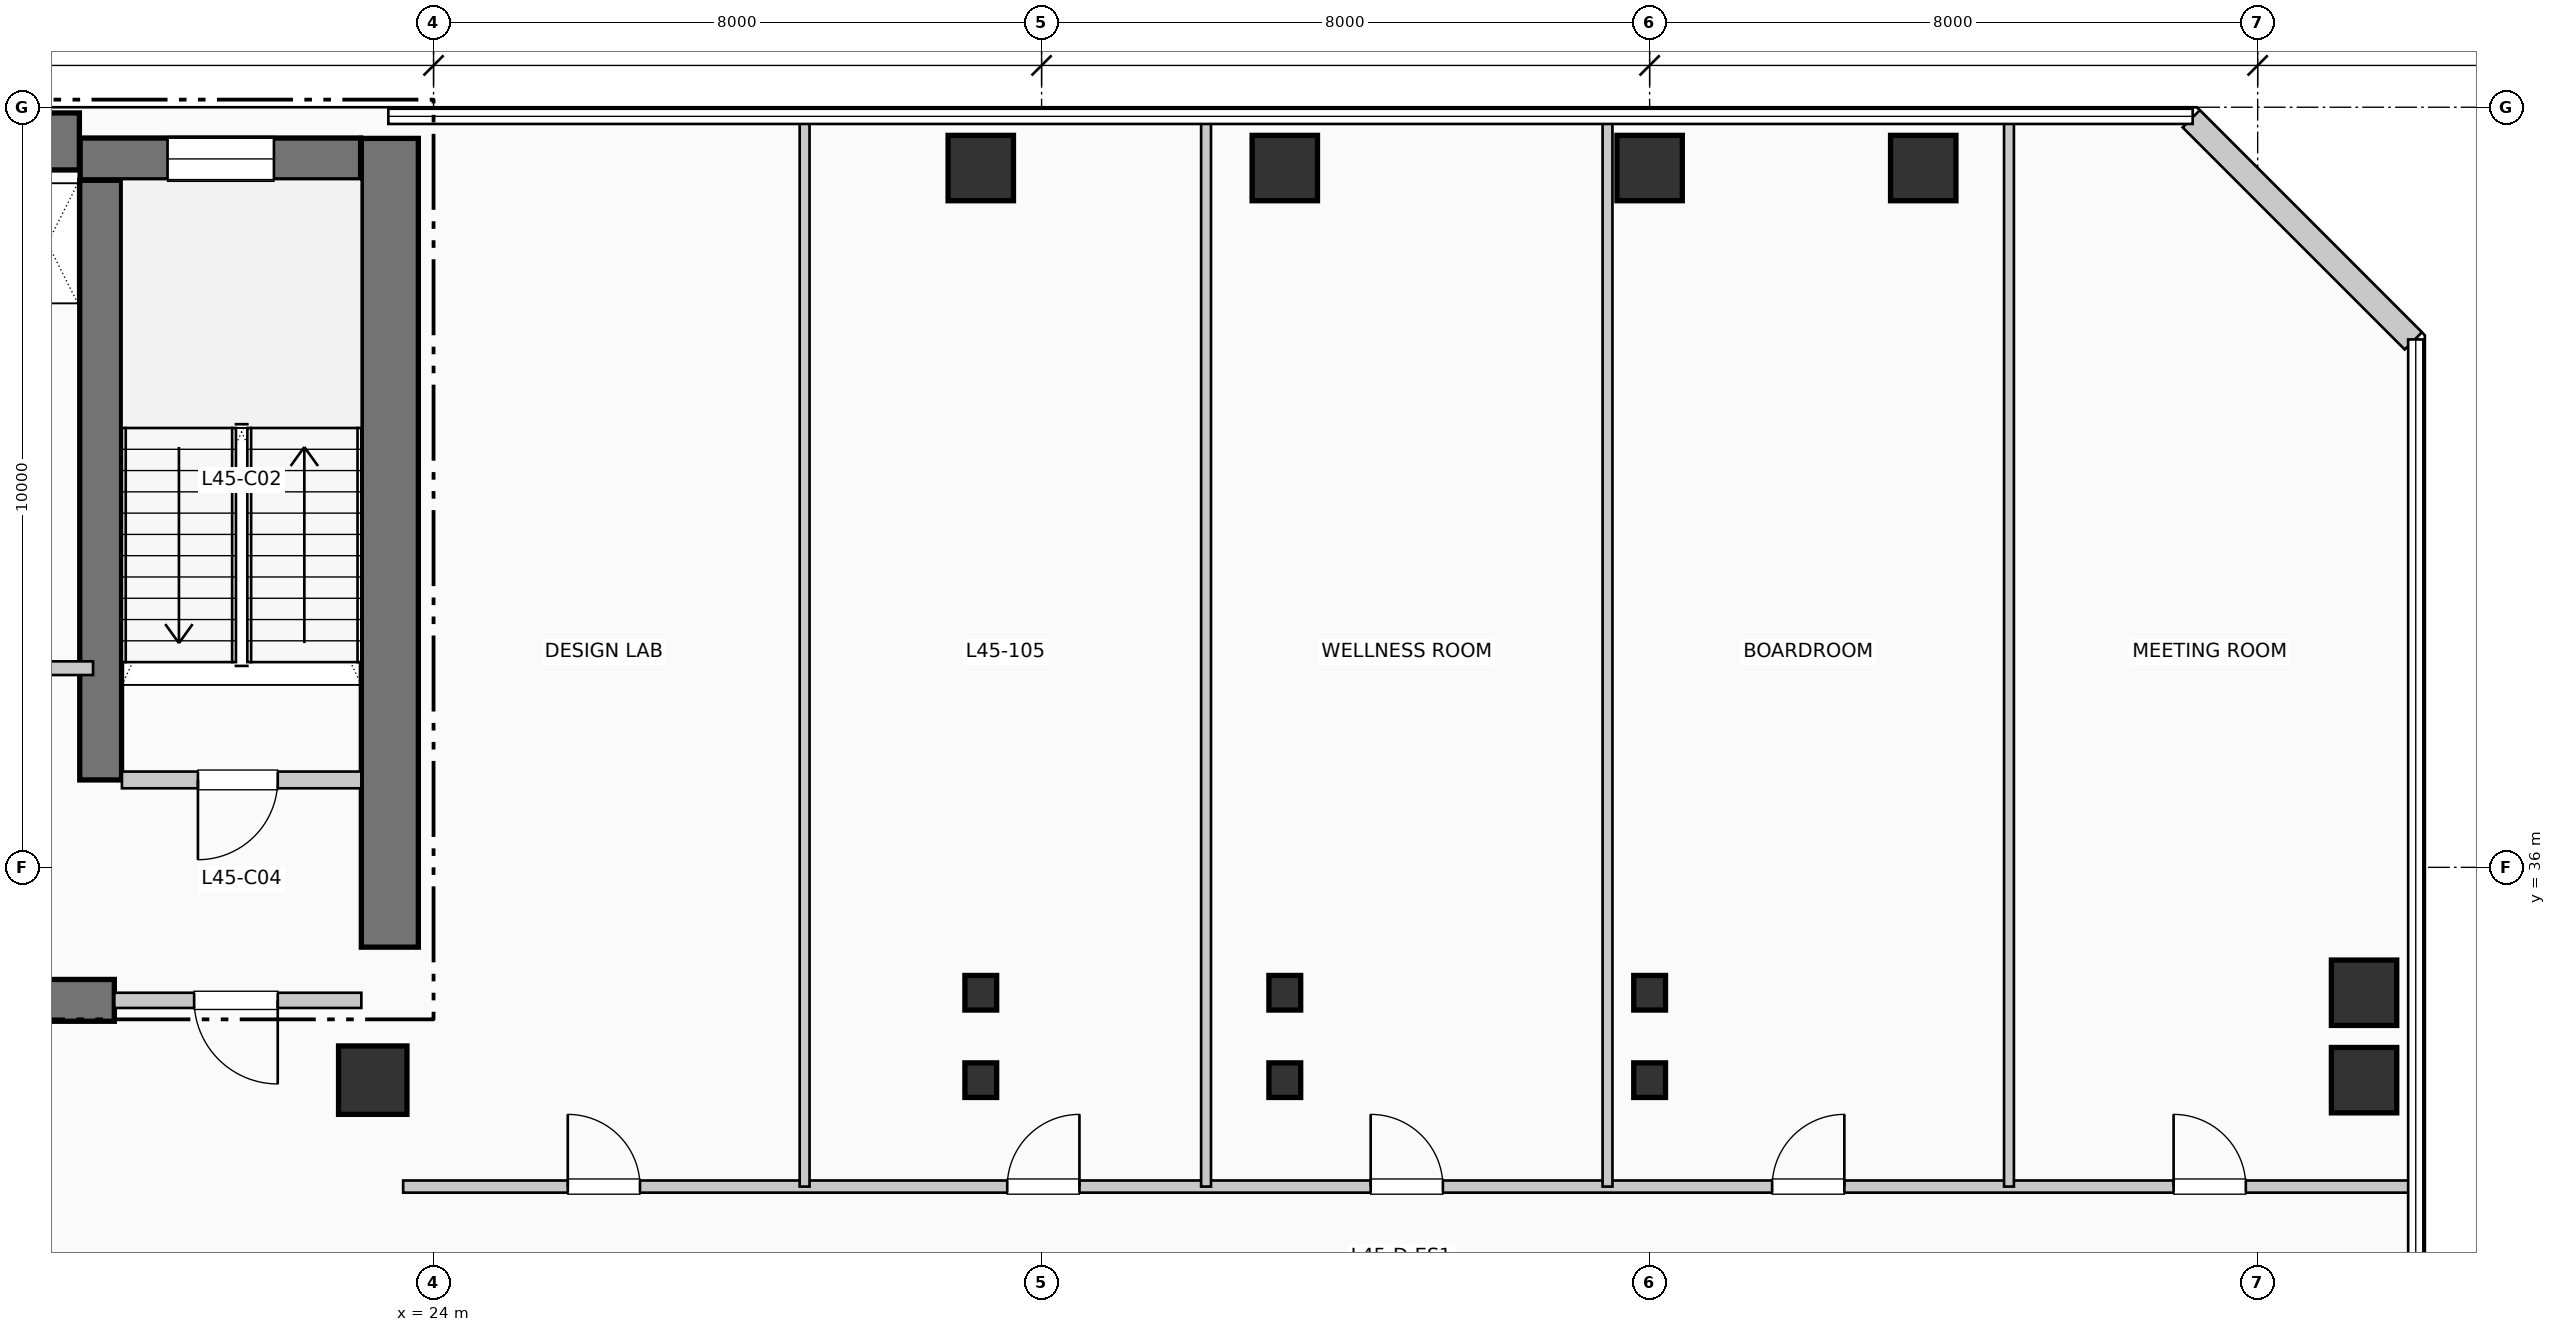
"""IFC4 building model, lengths in metres.
Left out: names, types, materials, properties, quantities, classifications, styles, units other than length and angle.
Written with IfcOpenShell. Run it as: python <this file> out.ifc"""

import sys

from ifc_helpers import new_model, si_unit, direction, frame, frame_2d, origin, origin_2d, place, context, subcontext, project, spatial, rectangle, i_section, extrude, element, fill, save


model = new_model("IFC4")
c1 = context("Model", 3, precision=1e-05, world=origin(), true_north=direction((0.0, 1.0)))
c2 = subcontext(c1, "Body", "Model", "MODEL_VIEW")
j1 = project(units=[si_unit("LENGTHUNIT", "METRE"), si_unit("PLANEANGLEUNIT", "RADIAN")], contexts=[c1])
p1 = place(None, origin())
s1 = spatial("IfcSite", under=j1, at=p1, CompositionType="ELEMENT")
p2 = place(p1, origin())
s2 = spatial("IfcBuilding", under=s1, at=p2, CompositionType="ELEMENT")
p3 = place(p2, frame((0.0, 0.0, 187.44)))
s3 = spatial("IfcBuildingStorey", under=s2, at=p3, CompositionType="ELEMENT", Elevation=187.44)
p4 = place(p3, frame((5.36, 45.55, 0.0), z_axis=(0.0, 0.0, 1.0), x_axis=(1.0, 0.0, 0.0)))
e1 = element("IfcWall", 1, at=p4, inside=s3, PredefinedType="SHEAR", context=c2, shape_type="SweptSolid", body=[
    extrude(rectangle(XDim=13.98, YDim=0.75, at=frame_2d((6.99, 0.0))), origin(), (0.0, 0.0, 1.0), 3.96),
])
p5 = place(p3, frame((23.425, 34.95, 0.0), z_axis=(0.0, 0.0, 1.0), x_axis=(0.0, 1.0, 0.0)))
e2 = element("IfcWall", 2, at=p5, inside=s3, PredefinedType="SHEAR", context=c2, shape_type="SweptSolid", body=[
    extrude(rectangle(XDim=10.64, YDim=0.75, at=frame_2d((5.32, 0.0))), origin(), (0.0, 0.0, 1.0), 3.96),
])
p6 = place(p3, frame((13.68, 34.25, 0.0), z_axis=(0.0, 0.0, 1.0), x_axis=(1.0, 0.0, 0.0)))
e3 = element("IfcWall", 3, at=p6, inside=s3, PredefinedType="SHEAR", context=c2, shape_type="SweptSolid", body=[
    extrude(rectangle(XDim=6.12, YDim=0.55, at=frame_2d((3.06, 0.0))), origin(), (0.0, 0.0, 1.0), 3.96),
])
p7 = place(p3, frame((19.62, 37.15, 0.0), z_axis=(0.0, 0.0, 1.0), x_axis=(0.0, 1.0, 0.0)))
e4 = element("IfcWall", 4, at=p7, inside=s3, PredefinedType="SHEAR", context=c2, shape_type="SweptSolid", body=[
    extrude(rectangle(XDim=7.89, YDim=0.55, at=frame_2d((3.945, 0.0))), origin(), (0.0, 0.0, 1.0), 3.96),
])
p8 = place(p3, frame((19.35, 45.32, 0.0), z_axis=(0.0, 0.0, 1.0), x_axis=(1.0, 0.0, 0.0)))
e5 = element("IfcWall", 5, at=p8, inside=s3, PredefinedType="SHEAR", context=c2, shape_type="SweptSolid", body=[
    extrude(rectangle(XDim=3.69, YDim=0.55, at=frame_2d((1.845, 0.0))), origin(), (0.0, 0.0, 1.0), 3.96),
])
p9 = place(p8, frame((1.15, 0.0, 1.05)))
e6 = element("IfcOpeningElement", 6, at=p9, cuts=e5, PredefinedType="OPENING", context=c2, shape_type="SweptSolid", body=[
    extrude(rectangle(XDim=1.4, YDim=1.8, at=frame_2d((0.7, 0.9))), frame((0.0, 0.285, 0.0), z_axis=(0.0, -1.0, 0.0), x_axis=(1.0, 0.0, 0.0)), (0.0, 0.0, 1.0), 0.57),
])
p10 = place(p3, frame((23.2, 33.2, 0.0), z_axis=(0.0, 0.0, 1.0), x_axis=(1.0, 0.0, 0.0)))
e7 = element("IfcColumn", 7, at=p10, inside=s3, PredefinedType="COLUMN", context=c2, shape_type="SweptSolid", body=[
    extrude(rectangle(XDim=0.9, YDim=0.9, at=origin_2d()), origin(), (0.0, 0.0, 1.0), 3.96),
])
for number, where, z_axis, x_axis in (
    (8, (31.2, 33.2, 0.0), (0.0, 0.0, 1.0), (1.0, 0.0, 0.0)),
    (9, (31.2, 34.35, 0.0), (0.0, 0.0, 1.0), (1.0, 0.0, 0.0)),
):
    element("IfcColumn", number, at=place(p3, frame(where, z_axis=z_axis, x_axis=x_axis)), inside=s3, PredefinedType="COLUMN", context=c2, shape_type="SweptSolid", body=[
        extrude(i_section(OverallWidth=0.418, OverallDepth=0.455, WebThickness=0.032, FlangeThickness=0.051, at=origin_2d()), origin(), (0.0, 0.0, 1.0), 3.96),
    ])
p11 = place(p3, frame((31.2, 45.2, 0.0), z_axis=(0.0, 0.0, 1.0), x_axis=(1.0, 0.0, 0.0)))
e10 = element("IfcColumn", 10, at=p11, inside=s3, PredefinedType="COLUMN", context=c2, shape_type="SweptSolid", body=[
    extrude(rectangle(XDim=0.86, YDim=0.86, at=origin_2d()), origin(), (0.0, 0.0, 1.0), 3.96),
])
for number, where, z_axis, x_axis in (
    (11, (35.2, 33.2, 0.0), (0.0, 0.0, 1.0), (1.0, 0.0, 0.0)),
    (12, (35.2, 34.35, 0.0), (0.0, 0.0, 1.0), (1.0, 0.0, 0.0)),
):
    element("IfcColumn", number, at=place(p3, frame(where, z_axis=z_axis, x_axis=x_axis)), inside=s3, PredefinedType="COLUMN", context=c2, shape_type="SweptSolid", body=[
        extrude(i_section(OverallWidth=0.418, OverallDepth=0.455, WebThickness=0.032, FlangeThickness=0.051, at=origin_2d()), origin(), (0.0, 0.0, 1.0), 3.96),
    ])
p12 = place(p3, frame((35.2, 45.2, 0.0), z_axis=(0.0, 0.0, 1.0), x_axis=(1.0, 0.0, 0.0)))
e13 = element("IfcColumn", 13, at=p12, inside=s3, PredefinedType="COLUMN", context=c2, shape_type="SweptSolid", body=[
    extrude(rectangle(XDim=0.86, YDim=0.86, at=origin_2d()), origin(), (0.0, 0.0, 1.0), 3.96),
])
for number, where, z_axis, x_axis in (
    (14, (40.0, 33.2, 0.0), (0.0, 0.0, 1.0), (1.0, 0.0, 0.0)),
    (15, (40.0, 34.35, 0.0), (0.0, 0.0, 1.0), (1.0, 0.0, 0.0)),
):
    element("IfcColumn", number, at=place(p3, frame(where, z_axis=z_axis, x_axis=x_axis)), inside=s3, PredefinedType="COLUMN", context=c2, shape_type="SweptSolid", body=[
        extrude(i_section(OverallWidth=0.418, OverallDepth=0.455, WebThickness=0.032, FlangeThickness=0.051, at=origin_2d()), origin(), (0.0, 0.0, 1.0), 3.96),
    ])
for number, where, z_axis, x_axis in (
    (16, (40.0, 45.2, 0.0), (0.0, 0.0, 1.0), (1.0, 0.0, 0.0)),
    (17, (43.6, 45.2, 0.0), (0.0, 0.0, 1.0), (1.0, 0.0, 0.0)),
    (18, (49.4, 33.2, 0.0), (0.0, 0.0, 1.0), (1.0, 0.0, 0.0)),
    (19, (49.4, 34.35, 0.0), (0.0, 0.0, 1.0), (1.0, 0.0, 0.0)),
):
    element("IfcColumn", number, at=place(p3, frame(where, z_axis=z_axis, x_axis=x_axis)), inside=s3, PredefinedType="COLUMN", context=c2, shape_type="SweptSolid", body=[
        extrude(rectangle(XDim=0.86, YDim=0.86, at=origin_2d()), origin(), (0.0, 0.0, 1.0), 3.96),
    ])
p13 = place(p3, frame((50.048, 42.926, 0.0), z_axis=(0.0, 0.0, 1.0), x_axis=(-0.707136318428, 0.707077242712, 0.0)))
e20 = element("IfcWall", 20, at=p13, inside=s3, PredefinedType="SOLIDWALL", context=c2, shape_type="SweptSolid", body=[
    extrude(rectangle(XDim=4.133, YDim=0.32, at=frame_2d((2.066, 0.0))), origin(), (0.0, 0.0, 1.0), 3.71),
])
p14 = place(p3, frame((19.9, 37.15, 0.0), z_axis=(0.0, 0.0, 1.0), x_axis=(1.0, 0.0, 0.0)))
e21 = element("IfcWall", 21, at=p14, inside=s3, PredefinedType="PARTITIONING", context=c2, shape_type="SweptSolid", body=[
    extrude(rectangle(XDim=3.15, YDim=0.22, at=frame_2d((1.575, 0.0))), origin(), (0.0, 0.0, 1.0), 3.71),
])
p15 = place(p14, frame((2.05, 0.0, 0.0), z_axis=(0.0, 0.0, 1.0), x_axis=(-1.0, 0.0, 0.0)))
e22 = element("IfcOpeningElement", 22, at=p15, cuts=e21, PredefinedType="OPENING", context=c2, shape_type="SweptSolid", body=[
    extrude(rectangle(XDim=1.05, YDim=2.15, at=frame_2d((0.525, 1.075))), frame((0.0, 0.12, 0.0), z_axis=(0.0, -1.0, 0.0), x_axis=(1.0, 0.0, 0.0)), (0.0, 0.0, 1.0), 0.24),
])
p16 = place(p3, frame((19.8, 34.25, 0.0), z_axis=(0.0, 0.0, 1.0), x_axis=(1.0, 0.0, 0.0)))
e23 = element("IfcWall", 23, at=p16, inside=s3, PredefinedType="PARTITIONING", context=c2, shape_type="SweptSolid", body=[
    extrude(rectangle(XDim=3.25, YDim=0.2, at=frame_2d((1.625, 0.0))), origin(), (0.0, 0.0, 1.0), 3.71),
])
p17 = place(p16, frame((2.15, 0.0, 0.0), z_axis=(0.0, 0.0, 1.0), x_axis=(-1.0, 0.0, 0.0)))
e24 = element("IfcOpeningElement", 24, at=p17, cuts=e23, PredefinedType="OPENING", context=c2, shape_type="SweptSolid", body=[
    extrude(rectangle(XDim=1.1, YDim=2.15, at=frame_2d((0.55, 1.075))), frame((0.0, 0.11, 0.0), z_axis=(0.0, -1.0, 0.0), x_axis=(1.0, 0.0, 0.0)), (0.0, 0.0, 1.0), 0.22),
])
p18 = place(p3, frame((17.68, 38.62, 0.0), z_axis=(0.0, 0.0, 1.0), x_axis=(1.0, 0.0, 0.0)))
e25 = element("IfcWall", 25, at=p18, inside=s3, PredefinedType="PARTITIONING", context=c2, shape_type="SweptSolid", body=[
    extrude(rectangle(XDim=1.84, YDim=0.18, at=frame_2d((0.92, 0.0))), origin(), (0.0, 0.0, 1.0), 3.71),
])
p19 = place(p18, frame((0.24, 0.0, 0.0)))
e26 = element("IfcOpeningElement", 26, at=p19, cuts=e25, PredefinedType="OPENING", context=c2, shape_type="SweptSolid", body=[
    extrude(rectangle(XDim=0.92, YDim=2.1, at=frame_2d((0.46, 1.05))), frame((0.0, 0.1, 0.0), z_axis=(0.0, -1.0, 0.0), x_axis=(1.0, 0.0, 0.0)), (0.0, 0.0, 1.0), 0.2),
])
p20 = place(p3, frame((23.6, 31.8, 0.0), z_axis=(0.0, 0.0, 1.0), x_axis=(1.0, 0.0, 0.0)))
e27 = element("IfcWall", 27, at=p20, inside=s3, PredefinedType="PARTITIONING", context=c2, shape_type="SweptSolid", body=[
    extrude(rectangle(XDim=26.41, YDim=0.16, at=frame_2d((13.205, 0.0))), origin(), (0.0, 0.0, 1.0), 3.71),
])
p21 = place(p20, frame((2.166, 0.0, 0.0)))
e28 = element("IfcOpeningElement", 28, at=p21, cuts=e27, PredefinedType="OPENING", context=c2, shape_type="SweptSolid", body=[
    extrude(rectangle(XDim=0.95, YDim=2.15, at=frame_2d((0.475, 1.075))), frame((0.0, 0.09, 0.0), z_axis=(0.0, -1.0, 0.0), x_axis=(1.0, 0.0, 0.0)), (0.0, 0.0, 1.0), 0.18),
])
p22 = place(p20, frame((7.948, 0.0, 0.0)))
e29 = element("IfcOpeningElement", 29, at=p22, cuts=e27, PredefinedType="OPENING", context=c2, shape_type="SweptSolid", body=[
    extrude(rectangle(XDim=0.95, YDim=2.15, at=frame_2d((0.475, 1.075))), frame((0.0, 0.09, 0.0), z_axis=(0.0, -1.0, 0.0), x_axis=(1.0, 0.0, 0.0)), (0.0, 0.0, 1.0), 0.18),
])
p23 = place(p20, frame((12.73, 0.0, 0.0)))
e30 = element("IfcOpeningElement", 30, at=p23, cuts=e27, PredefinedType="OPENING", context=c2, shape_type="SweptSolid", body=[
    extrude(rectangle(XDim=0.95, YDim=2.15, at=frame_2d((0.475, 1.075))), frame((0.0, 0.09, 0.0), z_axis=(0.0, -1.0, 0.0), x_axis=(1.0, 0.0, 0.0)), (0.0, 0.0, 1.0), 0.18),
])
p24 = place(p20, frame((18.012, 0.0, 0.0)))
e31 = element("IfcOpeningElement", 31, at=p24, cuts=e27, PredefinedType="OPENING", context=c2, shape_type="SweptSolid", body=[
    extrude(rectangle(XDim=0.95, YDim=2.15, at=frame_2d((0.475, 1.075))), frame((0.0, 0.09, 0.0), z_axis=(0.0, -1.0, 0.0), x_axis=(1.0, 0.0, 0.0)), (0.0, 0.0, 1.0), 0.18),
])
p25 = place(p20, frame((23.294, 0.0, 0.0)))
e32 = element("IfcOpeningElement", 32, at=p25, cuts=e27, PredefinedType="OPENING", context=c2, shape_type="SweptSolid", body=[
    extrude(rectangle(XDim=0.95, YDim=2.15, at=frame_2d((0.475, 1.075))), frame((0.0, 0.09, 0.0), z_axis=(0.0, -1.0, 0.0), x_axis=(1.0, 0.0, 0.0)), (0.0, 0.0, 1.0), 0.18),
])
for number, where, z_axis, x_axis in (
    (33, (28.882, 31.8, 0.0), (0.0, 0.0, 1.0), (0.0, 1.0, 0.0)),
    (34, (34.164, 31.8, 0.0), (0.0, 0.0, 1.0), (0.0, 1.0, 0.0)),
    (35, (39.446, 31.8, 0.0), (0.0, 0.0, 1.0), (0.0, 1.0, 0.0)),
    (36, (44.728, 31.8, 0.0), (0.0, 0.0, 1.0), (0.0, 1.0, 0.0)),
):
    element("IfcWall", number, at=place(p3, frame(where, z_axis=z_axis, x_axis=x_axis)), inside=s3, PredefinedType="PARTITIONING", context=c2, shape_type="SweptSolid", body=[
        extrude(rectangle(XDim=14.01, YDim=0.13, at=frame_2d((7.005, 0.0))), origin(), (0.0, 0.0, 1.0), 3.71),
    ])
p26 = place(p9, origin())
e37 = element("IfcWindow", 37, at=p26, inside=s3, PartitioningType="SINGLE_PANEL", PredefinedType="WINDOW", context=c2, shape_type="SweptSolid", body=[
    extrude(rectangle(XDim=1.4, YDim=1.8, at=frame_2d((0.7, 0.9))), frame((0.0, 0.03, 0.0), z_axis=(0.0, -1.0, 0.0), x_axis=(1.0, 0.0, 0.0)), (0.0, 0.0, 1.0), 0.06),
])
fill(e6, e37)
p27 = place(p15, origin())
e38 = element("IfcDoor", 38, at=p27, inside=s3, OperationType="SINGLE_SWING_LEFT", PredefinedType="DOOR", context=c2, shape_type="SweptSolid", body=[
    extrude(rectangle(XDim=1.05, YDim=2.15, at=frame_2d((0.525, 1.075))), frame((0.0, 0.025, 0.0), z_axis=(0.0, -1.0, 0.0), x_axis=(1.0, 0.0, 0.0)), (0.0, 0.0, 1.0), 0.05),
])
fill(e22, e38)
p28 = place(p17, origin())
e39 = element("IfcDoor", 39, at=p28, inside=s3, OperationType="SINGLE_SWING_RIGHT", PredefinedType="DOOR", context=c2, shape_type="SweptSolid", body=[
    extrude(rectangle(XDim=1.1, YDim=2.15, at=frame_2d((0.55, 1.075))), frame((0.0, 0.025, 0.0), z_axis=(0.0, -1.0, 0.0), x_axis=(1.0, 0.0, 0.0)), (0.0, 0.0, 1.0), 0.05),
])
fill(e24, e39)
p29 = place(p21, origin())
e40 = element("IfcDoor", 40, at=p29, inside=s3, OperationType="SINGLE_SWING_LEFT", PredefinedType="DOOR", context=c2, shape_type="SweptSolid", body=[
    extrude(rectangle(XDim=0.95, YDim=2.15, at=frame_2d((0.475, 1.075))), frame((0.0, 0.025, 0.0), z_axis=(0.0, -1.0, 0.0), x_axis=(1.0, 0.0, 0.0)), (0.0, 0.0, 1.0), 0.05),
])
fill(e28, e40)
p30 = place(p22, origin())
e41 = element("IfcDoor", 41, at=p30, inside=s3, OperationType="SINGLE_SWING_RIGHT", PredefinedType="DOOR", context=c2, shape_type="SweptSolid", body=[
    extrude(rectangle(XDim=0.95, YDim=2.15, at=frame_2d((0.475, 1.075))), frame((0.0, 0.025, 0.0), z_axis=(0.0, -1.0, 0.0), x_axis=(1.0, 0.0, 0.0)), (0.0, 0.0, 1.0), 0.05),
])
fill(e29, e41)
p31 = place(p23, origin())
e42 = element("IfcDoor", 42, at=p31, inside=s3, OperationType="SINGLE_SWING_LEFT", PredefinedType="DOOR", context=c2, shape_type="SweptSolid", body=[
    extrude(rectangle(XDim=0.95, YDim=2.15, at=frame_2d((0.475, 1.075))), frame((0.0, 0.025, 0.0), z_axis=(0.0, -1.0, 0.0), x_axis=(1.0, 0.0, 0.0)), (0.0, 0.0, 1.0), 0.05),
])
fill(e30, e42)
p32 = place(p24, origin())
e43 = element("IfcDoor", 43, at=p32, inside=s3, OperationType="SINGLE_SWING_RIGHT", PredefinedType="DOOR", context=c2, shape_type="SweptSolid", body=[
    extrude(rectangle(XDim=0.95, YDim=2.15, at=frame_2d((0.475, 1.075))), frame((0.0, 0.025, 0.0), z_axis=(0.0, -1.0, 0.0), x_axis=(1.0, 0.0, 0.0)), (0.0, 0.0, 1.0), 0.05),
])
fill(e31, e43)
p33 = place(p25, origin())
e44 = element("IfcDoor", 44, at=p33, inside=s3, OperationType="SINGLE_SWING_LEFT", PredefinedType="DOOR", context=c2, shape_type="SweptSolid", body=[
    extrude(rectangle(XDim=0.95, YDim=2.15, at=frame_2d((0.475, 1.075))), frame((0.0, 0.025, 0.0), z_axis=(0.0, -1.0, 0.0), x_axis=(1.0, 0.0, 0.0)), (0.0, 0.0, 1.0), 0.05),
])
fill(e32, e44)
save(model, sys.argv[1])
